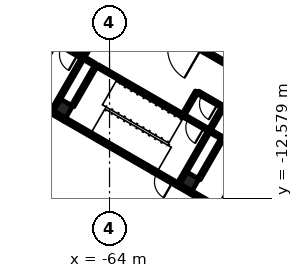
"""IFC4 building model, lengths in metres.
Left out: names, types, materials, properties, quantities, classifications, styles, units other than length and angle.
Written with IfcOpenShell. Run it as: python <this file> out.ifc"""

import sys

from ifc_helpers import new_model, si_unit, direction, frame, frame_2d, origin, origin_2d, place, context, subcontext, project, spatial, rectangle, extrude, element, fill, save


model = new_model("IFC4")
c1 = context("Model", 3, precision=1e-05, world=origin(), true_north=direction((0.0, 1.0)))
c2 = subcontext(c1, "Body", "Model", "MODEL_VIEW")
j1 = project(units=[si_unit("LENGTHUNIT", "METRE"), si_unit("PLANEANGLEUNIT", "RADIAN")], contexts=[c1])
p1 = place(None, origin())
s1 = spatial("IfcSite", under=j1, at=p1, CompositionType="ELEMENT")
p2 = place(p1, origin())
s2 = spatial("IfcBuilding", under=s1, at=p2, CompositionType="ELEMENT")
p3 = place(p2, origin())
s3 = spatial("IfcBuildingStorey", under=s2, at=p3, CompositionType="ELEMENT", Elevation=0.0)
for number, where, z_axis, x_axis in (
    (1, (-58.732, -11.471, -0.3), (0.0, 0.0, 1.0), (-0.5, -0.866, 0.0)),
    (2, (-67.046, -6.671, -0.3), (0.0, 0.0, 1.0), (-0.5, -0.866, 0.0)),
):
    element("IfcColumn", number, at=place(p3, frame(where, z_axis=z_axis, x_axis=x_axis)), inside=s3, PredefinedType="COLUMN", context=c2, shape_type="SweptSolid", body=[
        extrude(rectangle(XDim=0.9, YDim=0.9, at=origin_2d()), origin(), (0.0, 0.0, 1.0), 6.3),
    ])
p4 = place(p3, frame((-52.784, -15.569, 0.0), z_axis=(0.0, 0.0, 1.0), x_axis=(-0.866026575979, 0.499997969693, 0.0)))
e3 = element("IfcWall", 3, at=p4, inside=s3, PredefinedType="SOLIDWALL", context=c2, shape_type="SweptSolid", body=[
    extrude(rectangle(XDim=6.75, YDim=0.25, at=frame_2d((3.375, 0.0))), origin(), (0.0, 0.0, 1.0), 5.7),
])
p5 = place(p3, frame((-59.496, -11.694, 0.0), z_axis=(0.0, 0.0, 1.0), x_axis=(-0.866000971088, 0.500042316284, 0.0)))
e4 = element("IfcWall", 4, at=p5, inside=s3, PredefinedType="SOLIDWALL", context=c2, shape_type="SweptSolid", body=[
    extrude(rectangle(XDim=1.85, YDim=0.25, at=frame_2d((0.925, 0.0))), origin(), (0.0, 0.0, 1.0), 5.7),
])
p6 = place(p5, frame((0.4, 0.0, 0.0)))
e5 = element("IfcOpeningElement", 5, at=p6, cuts=e4, PredefinedType="OPENING", context=c2, shape_type="SweptSolid", body=[
    extrude(rectangle(XDim=1.2, YDim=2.1, at=frame_2d((0.6, 1.05))), frame((0.0, 0.135, 0.0), z_axis=(0.0, -1.0, 0.0), x_axis=(1.0, 0.0, 0.0)), (0.0, 0.0, 1.0), 0.27),
])
p7 = place(p3, frame((-61.098, -10.769, 0.0), z_axis=(0.0, 0.0, 1.0), x_axis=(-0.866026575979, 0.499997969693, 0.0)))
e6 = element("IfcWall", 6, at=p7, inside=s3, PredefinedType="SOLIDWALL", context=c2, shape_type="SweptSolid", body=[
    extrude(rectangle(XDim=6.75, YDim=0.25, at=frame_2d((3.375, 0.0))), origin(), (0.0, 0.0, 1.0), 5.7),
])
p8 = place(p3, frame((-67.81, -6.894, 0.0), z_axis=(0.0, 0.0, 1.0), x_axis=(-0.866033964044, 0.499985172903, 0.0)))
e7 = element("IfcWall", 7, at=p8, inside=s3, PredefinedType="SOLIDWALL", context=c2, shape_type="SweptSolid", body=[
    extrude(rectangle(XDim=1.85, YDim=0.25, at=frame_2d((0.925, 0.0))), origin(), (0.0, 0.0, 1.0), 5.7),
])
p9 = place(p8, frame((0.4, 0.0, 0.0)))
e8 = element("IfcOpeningElement", 8, at=p9, cuts=e7, PredefinedType="OPENING", context=c2, shape_type="SweptSolid", body=[
    extrude(rectangle(XDim=1.2, YDim=2.1, at=frame_2d((0.6, 1.05))), frame((0.0, 0.135, 0.0), z_axis=(0.0, -1.0, 0.0), x_axis=(1.0, 0.0, 0.0)), (0.0, 0.0, 1.0), 0.27),
])
for number, where, z_axis, x_axis in (
    (9, (-58.63, -12.194, 0.0), (0.0, 0.0, 1.0), (-0.866, 0.5, 0.0)),
    (10, (-66.944, -7.394, 0.0), (0.0, 0.0, 1.0), (-0.866, 0.5, 0.0)),
):
    element("IfcWall", number, at=place(p3, frame(where, z_axis=z_axis, x_axis=x_axis)), inside=s3, PredefinedType="SOLIDWALL", context=c2, shape_type="SweptSolid", body=[
        extrude(rectangle(XDim=1.0, YDim=0.25, at=frame_2d((0.5, 0.0))), origin(), (0.0, 0.0, 1.0), 5.7),
    ])
p10 = place(p3, frame((-56.567, -8.621, 0.0), z_axis=(0.0, 0.0, 1.0), x_axis=(-0.499933790963, -0.866063626216, 0.0)))
e11 = element("IfcWall", 11, at=p10, inside=s3, PredefinedType="SOLIDWALL", context=c2, shape_type="SweptSolid", body=[
    extrude(rectangle(XDim=3.1, YDim=0.2, at=frame_2d((1.55, 0.0))), origin(), (0.0, 0.0, 1.0), 5.7),
])
p11 = place(p3, frame((-57.433, -8.121, 0.0), z_axis=(0.0, 0.0, 1.0), x_axis=(-0.49999894854, -0.866026010844, 0.0)))
e12 = element("IfcWall", 12, at=p11, inside=s3, PredefinedType="SOLIDWALL", context=c2, shape_type="SweptSolid", body=[
    extrude(rectangle(XDim=4.0, YDim=0.2, at=frame_2d((2.0, 0.0))), origin(), (0.0, 0.0, 1.0), 5.7),
])
p12 = place(p3, frame((-64.881, -3.821, 0.0), z_axis=(0.0, 0.0, 1.0), x_axis=(-0.49999285859, -0.86602952684, 0.0)))
e13 = element("IfcWall", 13, at=p12, inside=s3, PredefinedType="SOLIDWALL", context=c2, shape_type="SweptSolid", body=[
    extrude(rectangle(XDim=3.1, YDim=0.2, at=frame_2d((1.55, 0.0))), origin(), (0.0, 0.0, 1.0), 5.7),
])
p13 = place(p3, frame((-65.747, -3.321, 0.0), z_axis=(0.0, 0.0, 1.0), x_axis=(-0.49999894854, -0.866026010844, 0.0)))
e14 = element("IfcWall", 14, at=p13, inside=s3, PredefinedType="SOLIDWALL", context=c2, shape_type="SweptSolid", body=[
    extrude(rectangle(XDim=4.0, YDim=0.2, at=frame_2d((2.0, 0.0))), origin(), (0.0, 0.0, 1.0), 5.7),
])
p14 = place(p3, frame((-57.52, -8.071, 0.0), z_axis=(0.0, 0.0, 1.0), x_axis=(-0.866002029911, 0.500040482552, 0.0)))
e15 = element("IfcWall", 15, at=p14, inside=s3, PredefinedType="SOLIDWALL", context=c2, shape_type="SweptSolid", body=[
    extrude(rectangle(XDim=1.75, YDim=0.2, at=frame_2d((0.875, 0.0))), origin(), (0.0, 0.0, 1.0), 5.7),
])
p15 = place(p14, frame((0.3, 0.0, 0.0)))
e16 = element("IfcOpeningElement", 16, at=p15, cuts=e15, PredefinedType="OPENING", context=c2, shape_type="SweptSolid", body=[
    extrude(rectangle(XDim=1.2, YDim=2.1, at=frame_2d((0.6, 1.05))), frame((0.0, 0.11, 0.0), z_axis=(0.0, -1.0, 0.0), x_axis=(1.0, 0.0, 0.0)), (0.0, 0.0, 1.0), 0.22),
])
p16 = place(p3, frame((-59.035, -7.196, 0.0), z_axis=(0.0, 0.0, 1.0), x_axis=(-0.866027239912, 0.49999681972, 0.0)))
e17 = element("IfcWall", 17, at=p16, inside=s3, PredefinedType="SOLIDWALL", context=c2, shape_type="SweptSolid", body=[
    extrude(rectangle(XDim=6.65, YDim=0.2, at=frame_2d((3.325, 0.0))), origin(), (0.0, 0.0, 1.0), 5.7),
])
p17 = place(p3, frame((-65.834, -3.271, 0.0), z_axis=(0.0, 0.0, 1.0), x_axis=(-0.866036909293, 0.499980071345, 0.0)))
e18 = element("IfcWall", 18, at=p17, inside=s3, PredefinedType="SOLIDWALL", context=c2, shape_type="SweptSolid", body=[
    extrude(rectangle(XDim=1.75, YDim=0.2, at=frame_2d((0.875, 0.0))), origin(), (0.0, 0.0, 1.0), 5.7),
])
p18 = place(p17, frame((0.3, 0.0, 0.0)))
e19 = element("IfcOpeningElement", 19, at=p18, cuts=e18, PredefinedType="OPENING", context=c2, shape_type="SweptSolid", body=[
    extrude(rectangle(XDim=1.2, YDim=2.1, at=frame_2d((0.6, 1.05))), frame((0.0, 0.11, 0.0), z_axis=(0.0, -1.0, 0.0), x_axis=(1.0, 0.0, 0.0)), (0.0, 0.0, 1.0), 0.22),
])
for number, where, z_axis, x_axis in (
    (20, (-56.533, -6.562, 0.0), (0.0, 0.0, 1.0), (-0.5, -0.866, 0.0)),
    (21, (-58.265, -5.562, 0.0), (0.0, 0.0, 1.0), (-0.5, -0.866, 0.0)),
):
    element("IfcWall", number, at=place(p3, frame(where, z_axis=z_axis, x_axis=x_axis)), inside=s3, PredefinedType="PARTITIONING", context=c2, shape_type="SweptSolid", body=[
        extrude(rectangle(XDim=1.7, YDim=0.2, at=frame_2d((0.85, 0.0))), origin(), (0.0, 0.0, 1.0), 5.1),
    ])
p19 = place(p3, frame((-64.847, -1.763, 0.0), z_axis=(0.0, 0.0, 1.0), x_axis=(-0.499954529098, -0.86605165483, 0.0)))
e22 = element("IfcWall", 22, at=p19, inside=s3, PredefinedType="PARTITIONING", context=c2, shape_type="SweptSolid", body=[
    extrude(rectangle(XDim=1.7, YDim=0.2, at=frame_2d((0.85, 0.0))), origin(), (0.0, 0.0, 1.0), 5.1),
])
p20 = place(p3, frame((-56.62, -6.513, 0.0), z_axis=(0.0, 0.0, 1.0), x_axis=(-0.865989075817, 0.500062916607, 0.0)))
e23 = element("IfcWall", 23, at=p20, inside=s3, PredefinedType="PARTITIONING", context=c2, shape_type="SweptSolid", body=[
    extrude(rectangle(XDim=1.8, YDim=0.2, at=frame_2d((0.9, 0.0))), origin(), (0.0, 0.0, 1.0), 5.1),
])
p21 = place(p20, frame((0.3, 0.0, 0.0)))
e24 = element("IfcOpeningElement", 24, at=p21, cuts=e23, PredefinedType="OPENING", context=c2, shape_type="SweptSolid", body=[
    extrude(rectangle(XDim=1.2, YDim=2.1, at=frame_2d((0.6, 1.05))), frame((0.0, 0.11, 0.0), z_axis=(0.0, -1.0, 0.0), x_axis=(1.0, 0.0, 0.0)), (0.0, 0.0, 1.0), 0.22),
])
p22 = place(p3, frame((-51.782, -6.333, 0.0), z_axis=(0.0, 0.0, 1.0), x_axis=(-0.866028853923, 0.499994024137, 0.0)))
e25 = element("IfcWall", 25, at=p22, inside=s3, PredefinedType="SOLIDWALL", context=c2, shape_type="SweptSolid", body=[
    extrude(rectangle(XDim=6.9, YDim=0.25, at=frame_2d((3.45, 0.0))), origin(), (0.0, 0.0, 1.0), 5.1),
])
p23 = place(p3, frame((-57.757, -2.883, 0.0), z_axis=(0.0, 0.0, 1.0), x_axis=(-0.866036505625, 0.499980770555, 0.0)))
e26 = element("IfcWall", 26, at=p23, inside=s3, PredefinedType="SOLIDWALL", context=c2, shape_type="SweptSolid", body=[
    extrude(rectangle(XDim=2.7, YDim=0.25, at=frame_2d((1.35, 0.0))), origin(), (0.0, 0.0, 1.0), 5.1),
])
p24 = place(p23, frame((0.25, 0.0, 0.0)))
e27 = element("IfcOpeningElement", 27, at=p24, cuts=e26, PredefinedType="OPENING", context=c2, shape_type="SweptSolid", body=[
    extrude(rectangle(XDim=2.2, YDim=2.1, at=frame_2d((1.1, 1.05))), frame((0.0, 0.135, 0.0), z_axis=(0.0, -1.0, 0.0), x_axis=(1.0, 0.0, 0.0)), (0.0, 0.0, 1.0), 0.27),
])
p25 = place(p3, frame((-56.654, -8.571, 0.0), z_axis=(0.0, 0.0, 1.0), x_axis=(-0.866094119867, 0.499880961361, 0.0)))
e28 = element("IfcWall", 28, at=p25, inside=s3, PredefinedType="PARTITIONING", context=c2, shape_type="SweptSolid", body=[
    extrude(rectangle(XDim=0.8, YDim=0.2, at=frame_2d((0.4, 0.0))), origin(), (0.0, 0.0, 1.0), 5.1),
])
p26 = place(p3, frame((-64.968, -3.771, 0.0), z_axis=(0.0, 0.0, 1.0), x_axis=(-0.865885638426, 0.500242002602, 0.0)))
e29 = element("IfcWall", 29, at=p26, inside=s3, PredefinedType="PARTITIONING", context=c2, shape_type="SweptSolid", body=[
    extrude(rectangle(XDim=0.8, YDim=0.2, at=frame_2d((0.4, 0.0))), origin(), (0.0, 0.0, 1.0), 5.1),
])
p27 = place(p6, origin())
e30 = element("IfcDoor", 30, at=p27, inside=s3, OperationType="SINGLE_SWING_LEFT", PredefinedType="DOOR", context=c2, shape_type="SweptSolid", body=[
    extrude(rectangle(XDim=1.2, YDim=2.1, at=frame_2d((0.6, 1.05))), frame((0.0, 0.025, 0.0), z_axis=(0.0, -1.0, 0.0), x_axis=(1.0, 0.0, 0.0)), (0.0, 0.0, 1.0), 0.05),
])
fill(e5, e30)
p28 = place(p15, origin())
e31 = element("IfcDoor", 31, at=p28, inside=s3, OperationType="SINGLE_SWING_LEFT", PredefinedType="DOOR", context=c2, shape_type="SweptSolid", body=[
    extrude(rectangle(XDim=1.2, YDim=2.1, at=frame_2d((0.6, 1.05))), frame((0.0, 0.025, 0.0), z_axis=(0.0, -1.0, 0.0), x_axis=(1.0, 0.0, 0.0)), (0.0, 0.0, 1.0), 0.05),
])
fill(e16, e31)
p29 = place(p18, origin())
e32 = element("IfcDoor", 32, at=p29, inside=s3, OperationType="SINGLE_SWING_LEFT", PredefinedType="DOOR", context=c2, shape_type="SweptSolid", body=[
    extrude(rectangle(XDim=1.2, YDim=2.1, at=frame_2d((0.6, 1.05))), frame((0.0, 0.025, 0.0), z_axis=(0.0, -1.0, 0.0), x_axis=(1.0, 0.0, 0.0)), (0.0, 0.0, 1.0), 0.05),
])
fill(e19, e32)
p30 = place(p21, origin())
e33 = element("IfcDoor", 33, at=p30, inside=s3, OperationType="SINGLE_SWING_LEFT", PredefinedType="DOOR", context=c2, shape_type="SweptSolid", body=[
    extrude(rectangle(XDim=1.2, YDim=2.1, at=frame_2d((0.6, 1.05))), frame((0.0, 0.025, 0.0), z_axis=(0.0, -1.0, 0.0), x_axis=(1.0, 0.0, 0.0)), (0.0, 0.0, 1.0), 0.05),
])
fill(e24, e33)
save(model, sys.argv[1])
